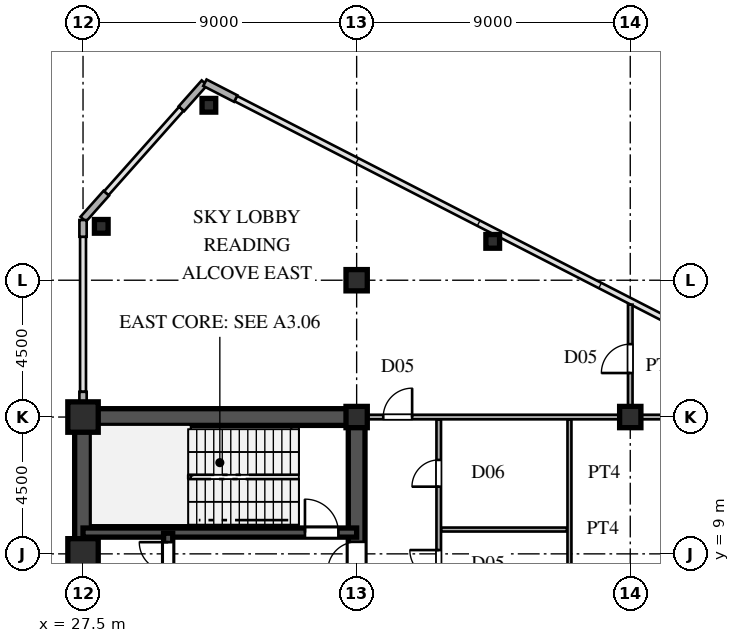
"""IFC4 building model, lengths in metres.
Left out: names, types, materials, properties, quantities, classifications, styles, units other than length and angle.
Written with IfcOpenShell. Run it as: python <this file> out.ifc"""

import sys

from ifc_helpers import new_model, si_unit, direction, frame, frame_2d, origin, origin_2d, place, context, subcontext, project, spatial, rectangle, hollow_rectangle, i_section, extrude, source, transform, mapped, element, fill, save


model = new_model("IFC4")
c1 = context("Model", 3, precision=1e-05, world=origin(), true_north=direction((0.0, 1.0)))
c2 = subcontext(c1, "Body", "Model", "MODEL_VIEW")
j1 = project(units=[si_unit("LENGTHUNIT", "METRE"), si_unit("PLANEANGLEUNIT", "RADIAN")], contexts=[c1])
p1 = place(None, origin())
s1 = spatial("IfcSite", under=j1, at=p1, CompositionType="ELEMENT")
p2 = place(p1, origin())
s2 = spatial("IfcBuilding", under=s1, at=p2, CompositionType="ELEMENT")
p3 = place(p2, frame((0.0, 0.0, 135.6)))
s3 = spatial("IfcBuildingStorey", under=s2, at=p3, CompositionType="ELEMENT", Elevation=135.6)
m1 = source(origin(), c2, "Body", "SweptSolid", [
    extrude(hollow_rectangle(XDim=1.0, YDim=1.0, WallThickness=0.042, at=origin_2d()), origin(), (0.0, 0.0, 1.0), 4.8),
])
for number, where, z_axis, x_axis in (
    (1, (27.5, 9.0, 0.0), (0.0, 0.0, 1.0), (1.0, 0.0, 0.0)),
    (2, (27.5, 13.5, 0.0), (0.0, 0.0, 1.0), (1.0, 0.0, 0.0)),
):
    element("IfcColumn", number, at=place(p3, frame(where, z_axis=z_axis, x_axis=x_axis)), inside=s3, PredefinedType="COLUMN", context=c2, shape_type="MappedRepresentation", body=[
        mapped(m1, transform((0.0, 0.0, 0.0), scale=1.0)),
    ])
m2 = source(origin(), c2, "Body", "SweptSolid", [
    extrude(i_section(OverallWidth=0.7, OverallDepth=0.7, WebThickness=0.028, FlangeThickness=0.045, at=origin_2d()), origin(), (0.0, 0.0, 1.0), 4.8),
])
for number, where, z_axis, x_axis in (
    (3, (36.5, 13.5, 0.0), (0.0, 0.0, 1.0), (1.0, 0.0, 0.0)),
    (4, (36.5, 18.0, 0.0), (0.0, 0.0, 1.0), (1.0, 0.0, 0.0)),
    (5, (45.5, 13.5, 0.0), (0.0, 0.0, 1.0), (1.0, 0.0, 0.0)),
):
    element("IfcColumn", number, at=place(p3, frame(where, z_axis=z_axis, x_axis=x_axis)), inside=s3, PredefinedType="COLUMN", context=c2, shape_type="MappedRepresentation", body=[
        mapped(m2, transform((0.0, 0.0, 0.0), scale=1.0)),
    ])
m3 = source(origin(), c2, "Body", "SweptSolid", [
    extrude(hollow_rectangle(XDim=0.45, YDim=0.45, WallThickness=0.018, at=origin_2d()), origin(), (0.0, 0.0, 1.0), 4.8),
])
for number, where, z_axis, x_axis in (
    (6, (31.64, 23.754, 0.0), (0.0, 0.0, 1.0), (1.0, 0.0, 0.0)),
    (7, (28.1, 19.772, 0.0), (0.0, 0.0, 1.0), (1.0, 0.0, 0.0)),
    (8, (40.976, 19.278, 0.0), (0.0, 0.0, 1.0), (1.0, 0.0, 0.0)),
):
    element("IfcColumn", number, at=place(p3, frame(where, z_axis=z_axis, x_axis=x_axis)), inside=s3, PredefinedType="COLUMN", context=c2, shape_type="MappedRepresentation", body=[
        mapped(m3, transform((0.0, 0.0, 0.0), scale=1.0)),
    ])
p4 = place(p3, frame((32.523, 23.975, 0.0), z_axis=(0.0, 0.0, 1.0), x_axis=(-0.889797395748, 0.456355776255, 0.0)))
e9 = element("IfcWall", 9, at=p4, inside=s3, PredefinedType="SOLIDWALL", context=c2, shape_type="SweptSolid", body=[
    extrude(rectangle(XDim=1.14, YDim=0.24, at=frame_2d((0.57, 0.0))), origin(), (0.0, 0.0, 1.0), 4.58),
])
for number, where, z_axis, x_axis in (
    (10, (31.493, 24.492, 0.0), (0.0, 0.0, 1.0), (-0.664, -0.747, 0.0)),
    (11, (28.264, 20.86, 0.0), (0.0, 0.0, 1.0), (-0.664, -0.747, 0.0)),
):
    element("IfcWall", number, at=place(p3, frame(where, z_axis=z_axis, x_axis=x_axis)), inside=s3, PredefinedType="SOLIDWALL", context=c2, shape_type="SweptSolid", body=[
        extrude(rectangle(XDim=1.14, YDim=0.24, at=frame_2d((0.57, 0.0))), origin(), (0.0, 0.0, 1.0), 4.58),
    ])
p5 = place(p3, frame((27.5, 13.78, 0.0), z_axis=(0.0, 0.0, 1.0), x_axis=(0.0, 1.0, 0.0)))
e12 = element("IfcWall", 12, at=p5, inside=s3, PredefinedType="SOLIDWALL", context=c2, shape_type="SweptSolid", body=[
    extrude(rectangle(XDim=0.55, YDim=0.24, at=frame_2d((0.275, 0.0))), origin(), (0.0, 0.0, 1.0), 4.08),
])
p6 = place(p3, frame((27.5, 19.43, 0.0), z_axis=(0.0, 0.0, 1.0), x_axis=(0.0, 1.0, 0.0)))
e13 = element("IfcWall", 13, at=p6, inside=s3, PredefinedType="SOLIDWALL", context=c2, shape_type="SweptSolid", body=[
    extrude(rectangle(XDim=0.55, YDim=0.24, at=frame_2d((0.275, 0.0))), origin(), (0.0, 0.0, 1.0), 4.58),
])
p7 = place(p3, frame((27.5, 1.3, 0.0), z_axis=(0.0, 0.0, 1.0), x_axis=(0.0, 1.0, 0.0)))
e14 = element("IfcWall", 14, at=p7, inside=s3, PredefinedType="SHEAR", context=c2, shape_type="SweptSolid", body=[
    extrude(rectangle(XDim=12.2, YDim=0.55, at=frame_2d((6.1, 0.0))), origin(), (0.0, 0.0, 1.0), 4.58),
])
p8 = place(p3, frame((27.5, 13.5, 0.0), z_axis=(0.0, 0.0, 1.0), x_axis=(1.0, 0.0, 0.0)))
e15 = element("IfcWall", 15, at=p8, inside=s3, PredefinedType="SHEAR", context=c2, shape_type="SweptSolid", body=[
    extrude(rectangle(XDim=9.0, YDim=0.55, at=frame_2d((4.5, 0.0))), origin(), (0.0, 0.0, 1.0), 4.58),
])
p9 = place(p3, frame((36.5, 8.2, 0.0), z_axis=(0.0, 0.0, 1.0), x_axis=(0.0, 1.0, 0.0)))
e16 = element("IfcWall", 16, at=p9, inside=s3, PredefinedType="SHEAR", context=c2, shape_type="SweptSolid", body=[
    extrude(rectangle(XDim=5.45, YDim=0.55, at=frame_2d((2.725, 0.0))), origin(), (0.0, 0.0, 1.0), 4.58),
])
p10 = place(p9, frame((0.245, 0.0, 0.0)))
e17 = element("IfcOpeningElement", 17, at=p10, cuts=e16, PredefinedType="OPENING", context=c2, shape_type="SweptSolid", body=[
    extrude(rectangle(XDim=0.95, YDim=2.15, at=frame_2d((0.475, 1.075))), frame((0.0, 0.285, 0.0), z_axis=(0.0, -1.0, 0.0), x_axis=(1.0, 0.0, 0.0)), (0.0, 0.0, 1.0), 0.57),
])
p11 = place(p3, frame((27.5, 9.7, 0.0), z_axis=(0.0, 0.0, 1.0), x_axis=(1.0, 0.0, 0.0)))
e18 = element("IfcWall", 18, at=p11, inside=s3, PredefinedType="SHEAR", context=c2, shape_type="SweptSolid", body=[
    extrude(rectangle(XDim=9.0, YDim=0.3, at=frame_2d((4.5, 0.0))), origin(), (0.0, 0.0, 1.0), 4.58),
])
p12 = place(p11, frame((7.3, 0.0, 0.0)))
e19 = element("IfcOpeningElement", 19, at=p12, cuts=e18, PredefinedType="OPENING", context=c2, shape_type="SweptSolid", body=[
    extrude(rectangle(XDim=1.1, YDim=2.2, at=frame_2d((0.55, 1.1))), frame((0.0, 0.16, 0.0), z_axis=(0.0, -1.0, 0.0), x_axis=(1.0, 0.0, 0.0)), (0.0, 0.0, 1.0), 0.32),
])
p13 = place(p3, frame((30.3, 8.15, 0.0), z_axis=(0.0, 0.0, 1.0), x_axis=(0.0, 1.0, 0.0)))
e20 = element("IfcWall", 20, at=p13, inside=s3, PredefinedType="SHEAR", context=c2, shape_type="SweptSolid", body=[
    extrude(rectangle(XDim=1.53, YDim=0.3, at=frame_2d((0.765, 0.0))), origin(), (0.0, 0.0, 1.0), 4.58),
])
p14 = place(p13, frame((0.285, 0.0, 0.0)))
e21 = element("IfcOpeningElement", 21, at=p14, cuts=e20, PredefinedType="OPENING", context=c2, shape_type="SweptSolid", body=[
    extrude(rectangle(XDim=0.95, YDim=2.15, at=frame_2d((0.475, 1.075))), frame((0.0, 0.16, 0.0), z_axis=(0.0, -1.0, 0.0), x_axis=(1.0, 0.0, 0.0)), (0.0, 0.0, 1.0), 0.32),
])
p15 = place(p3, frame((39.285, 9.8, 0.0), z_axis=(0.0, 0.0, 1.0), x_axis=(1.0, 0.0, 0.0)))
e22 = element("IfcWall", 22, at=p15, inside=s3, PredefinedType="PARTITIONING", context=c2, shape_type="SweptSolid", body=[
    extrude(rectangle(XDim=4.13, YDim=0.13, at=frame_2d((2.065, 0.0))), origin(), (0.0, 0.0, 1.0), 4.58),
])
p16 = place(p3, frame((36.78, 13.5, 0.0), z_axis=(0.0, 0.0, 1.0), x_axis=(1.0, 0.0, 0.0)))
e23 = element("IfcWall", 23, at=p16, inside=s3, PredefinedType="PARTITIONING", context=c2, shape_type="SweptSolid", body=[
    extrude(rectangle(XDim=16.167, YDim=0.15, at=frame_2d((8.083, 0.0))), origin(), (0.0, 0.0, 1.0), 3.98),
])
p17 = place(p16, frame((0.595, 0.0, 0.0)))
e24 = element("IfcOpeningElement", 24, at=p17, cuts=e23, PredefinedType="OPENING", context=c2, shape_type="SweptSolid", body=[
    extrude(rectangle(XDim=0.95, YDim=2.15, at=frame_2d((0.475, 1.075))), frame((0.0, 0.085, 0.0), z_axis=(0.0, -1.0, 0.0), x_axis=(1.0, 0.0, 0.0)), (0.0, 0.0, 1.0), 0.17),
])
p18 = place(p3, frame((39.2, -13.415, 0.0), z_axis=(0.0, 0.0, 1.0), x_axis=(0.0, 1.0, 0.0)))
e25 = element("IfcWall", 25, at=p18, inside=s3, PredefinedType="PARTITIONING", context=c2, shape_type="SweptSolid", body=[
    extrude(rectangle(XDim=26.83, YDim=0.15, at=frame_2d((13.415, 0.0))), origin(), (0.0, 0.0, 1.0), 4.58),
])
p19 = place(p18, frame((12.94, 0.0, 0.0)))
e26 = element("IfcOpeningElement", 26, at=p19, cuts=e25, PredefinedType="OPENING", context=c2, shape_type="SweptSolid", body=[
    extrude(rectangle(XDim=0.95, YDim=2.15, at=frame_2d((0.475, 1.075))), frame((0.0, 0.085, 0.0), z_axis=(0.0, -1.0, 0.0), x_axis=(1.0, 0.0, 0.0)), (0.0, 0.0, 1.0), 0.17),
])
p20 = place(p18, frame((1.325, 0.0, 0.0)))
e27 = element("IfcOpeningElement", 27, at=p20, cuts=e25, PredefinedType="OPENING", context=c2, shape_type="SweptSolid", body=[
    extrude(rectangle(XDim=0.88, YDim=2.1, at=frame_2d((0.44, 1.05))), frame((0.0, 0.085, 0.0), z_axis=(0.0, -1.0, 0.0), x_axis=(1.0, 0.0, 0.0)), (0.0, 0.0, 1.0), 0.17),
])
p21 = place(p18, frame((4.29, 0.0, 0.0)))
e28 = element("IfcOpeningElement", 28, at=p21, cuts=e25, PredefinedType="OPENING", context=c2, shape_type="SweptSolid", body=[
    extrude(rectangle(XDim=0.95, YDim=2.15, at=frame_2d((0.475, 1.075))), frame((0.0, 0.085, 0.0), z_axis=(0.0, -1.0, 0.0), x_axis=(1.0, 0.0, 0.0)), (0.0, 0.0, 1.0), 0.17),
])
p22 = place(p18, frame((21.59, 0.0, 0.0)))
e29 = element("IfcOpeningElement", 29, at=p22, cuts=e25, PredefinedType="OPENING", context=c2, shape_type="SweptSolid", body=[
    extrude(rectangle(XDim=0.95, YDim=2.15, at=frame_2d((0.475, 1.075))), frame((0.0, 0.085, 0.0), z_axis=(0.0, -1.0, 0.0), x_axis=(1.0, 0.0, 0.0)), (0.0, 0.0, 1.0), 0.17),
])
p23 = place(p18, frame((24.625, 0.0, 0.0)))
e30 = element("IfcOpeningElement", 30, at=p23, cuts=e25, PredefinedType="OPENING", context=c2, shape_type="SweptSolid", body=[
    extrude(rectangle(XDim=0.88, YDim=2.1, at=frame_2d((0.44, 1.05))), frame((0.0, 0.085, 0.0), z_axis=(0.0, -1.0, 0.0), x_axis=(1.0, 0.0, 0.0)), (0.0, 0.0, 1.0), 0.17),
])
p24 = place(p3, frame((43.5, 7.585, 0.0), z_axis=(0.0, 0.0, 1.0), x_axis=(0.0, 1.0, 0.0)))
e31 = element("IfcWall", 31, at=p24, inside=s3, PredefinedType="PARTITIONING", context=c2, shape_type="SweptSolid", body=[
    extrude(rectangle(XDim=5.83, YDim=0.13, at=frame_2d((2.915, 0.0))), origin(), (0.0, 0.0, 1.0), 4.58),
])
p25 = place(p3, frame((45.5, 13.585, 0.0), z_axis=(0.0, 0.0, 1.0), x_axis=(0.0, 1.0, 0.0)))
e32 = element("IfcWall", 32, at=p25, inside=s3, PredefinedType="PARTITIONING", context=c2, shape_type="SweptSolid", body=[
    extrude(rectangle(XDim=3.611, YDim=0.15, at=frame_2d((1.806, 0.0))), origin(), (0.0, 0.0, 1.0), 4.58),
])
p26 = place(p25, frame((1.363, 0.0, 0.0)))
e33 = element("IfcOpeningElement", 33, at=p26, cuts=e32, PredefinedType="OPENING", context=c2, shape_type="SweptSolid", body=[
    extrude(rectangle(XDim=0.95, YDim=2.15, at=frame_2d((0.475, 1.075))), frame((0.0, 0.085, 0.0), z_axis=(0.0, -1.0, 0.0), x_axis=(1.0, 0.0, 0.0)), (0.0, 0.0, 1.0), 0.17),
])
m4 = source(origin(), c2, "Body", "SweptSolid", [
    extrude(rectangle(XDim=0.95, YDim=2.15, at=frame_2d((0.475, 1.075))), frame((0.0, 0.025, 0.0), z_axis=(0.0, -1.0, 0.0), x_axis=(1.0, 0.0, 0.0)), (0.0, 0.0, 1.0), 0.05),
])
p27 = place(p10, origin())
e34 = element("IfcDoor", 34, at=p27, inside=s3, OperationType="SINGLE_SWING_LEFT", PredefinedType="DOOR", context=c2, shape_type="MappedRepresentation", body=[
    mapped(m4, transform((0.0, 0.0, 0.0), scale=1.0)),
])
fill(e17, e34)
m5 = source(origin(), c2, "Body", "SweptSolid", [
    extrude(rectangle(XDim=1.1, YDim=2.2, at=frame_2d((0.55, 1.1))), frame((0.0, 0.025, 0.0), z_axis=(0.0, -1.0, 0.0), x_axis=(1.0, 0.0, 0.0)), (0.0, 0.0, 1.0), 0.05),
])
p28 = place(p12, origin())
e35 = element("IfcDoor", 35, at=p28, inside=s3, OperationType="SINGLE_SWING_LEFT", PredefinedType="DOOR", context=c2, shape_type="MappedRepresentation", body=[
    mapped(m5, transform((0.0, 0.0, 0.0), scale=1.0)),
])
fill(e19, e35)
p29 = place(p14, origin())
e36 = element("IfcDoor", 36, at=p29, inside=s3, OperationType="SINGLE_SWING_RIGHT", PredefinedType="DOOR", context=c2, shape_type="MappedRepresentation", body=[
    mapped(m4, transform((0.0, 0.0, 0.0), scale=1.0)),
])
fill(e21, e36)
m6 = source(origin(), c2, "Body", "SweptSolid", [
    extrude(rectangle(XDim=0.95, YDim=2.15, at=frame_2d((0.475, 1.075))), frame((0.0, 0.025, 0.0), z_axis=(0.0, -1.0, 0.0), x_axis=(1.0, 0.0, 0.0)), (0.0, 0.0, 1.0), 0.05),
])
p30 = place(p17, origin())
e37 = element("IfcDoor", 37, at=p30, inside=s3, OperationType="SINGLE_SWING_RIGHT", PredefinedType="DOOR", context=c2, shape_type="MappedRepresentation", body=[
    mapped(m6, transform((0.0, 0.0, 0.0), scale=1.0)),
])
fill(e24, e37)
p31 = place(p22, origin())
e38 = element("IfcDoor", 38, at=p31, inside=s3, OperationType="SINGLE_SWING_RIGHT", PredefinedType="DOOR", context=c2, shape_type="MappedRepresentation", body=[
    mapped(m6, transform((0.0, 0.0, 0.0), scale=1.0)),
])
fill(e29, e38)
m7 = source(origin(), c2, "Body", "SweptSolid", [
    extrude(rectangle(XDim=0.88, YDim=2.1, at=frame_2d((0.44, 1.05))), frame((0.0, 0.025, 0.0), z_axis=(0.0, -1.0, 0.0), x_axis=(1.0, 0.0, 0.0)), (0.0, 0.0, 1.0), 0.05),
])
p32 = place(p23, origin())
e39 = element("IfcDoor", 39, at=p32, inside=s3, OperationType="SINGLE_SWING_LEFT", PredefinedType="DOOR", context=c2, shape_type="MappedRepresentation", body=[
    mapped(m7, transform((0.0, 0.0, 0.0), scale=1.0)),
])
fill(e30, e39)
p33 = place(p26, origin())
e40 = element("IfcDoor", 40, at=p33, inside=s3, OperationType="SINGLE_SWING_LEFT", PredefinedType="DOOR", context=c2, shape_type="MappedRepresentation", body=[
    mapped(m6, transform((0.0, 0.0, 0.0), scale=1.0)),
])
fill(e33, e40)
save(model, sys.argv[1])
